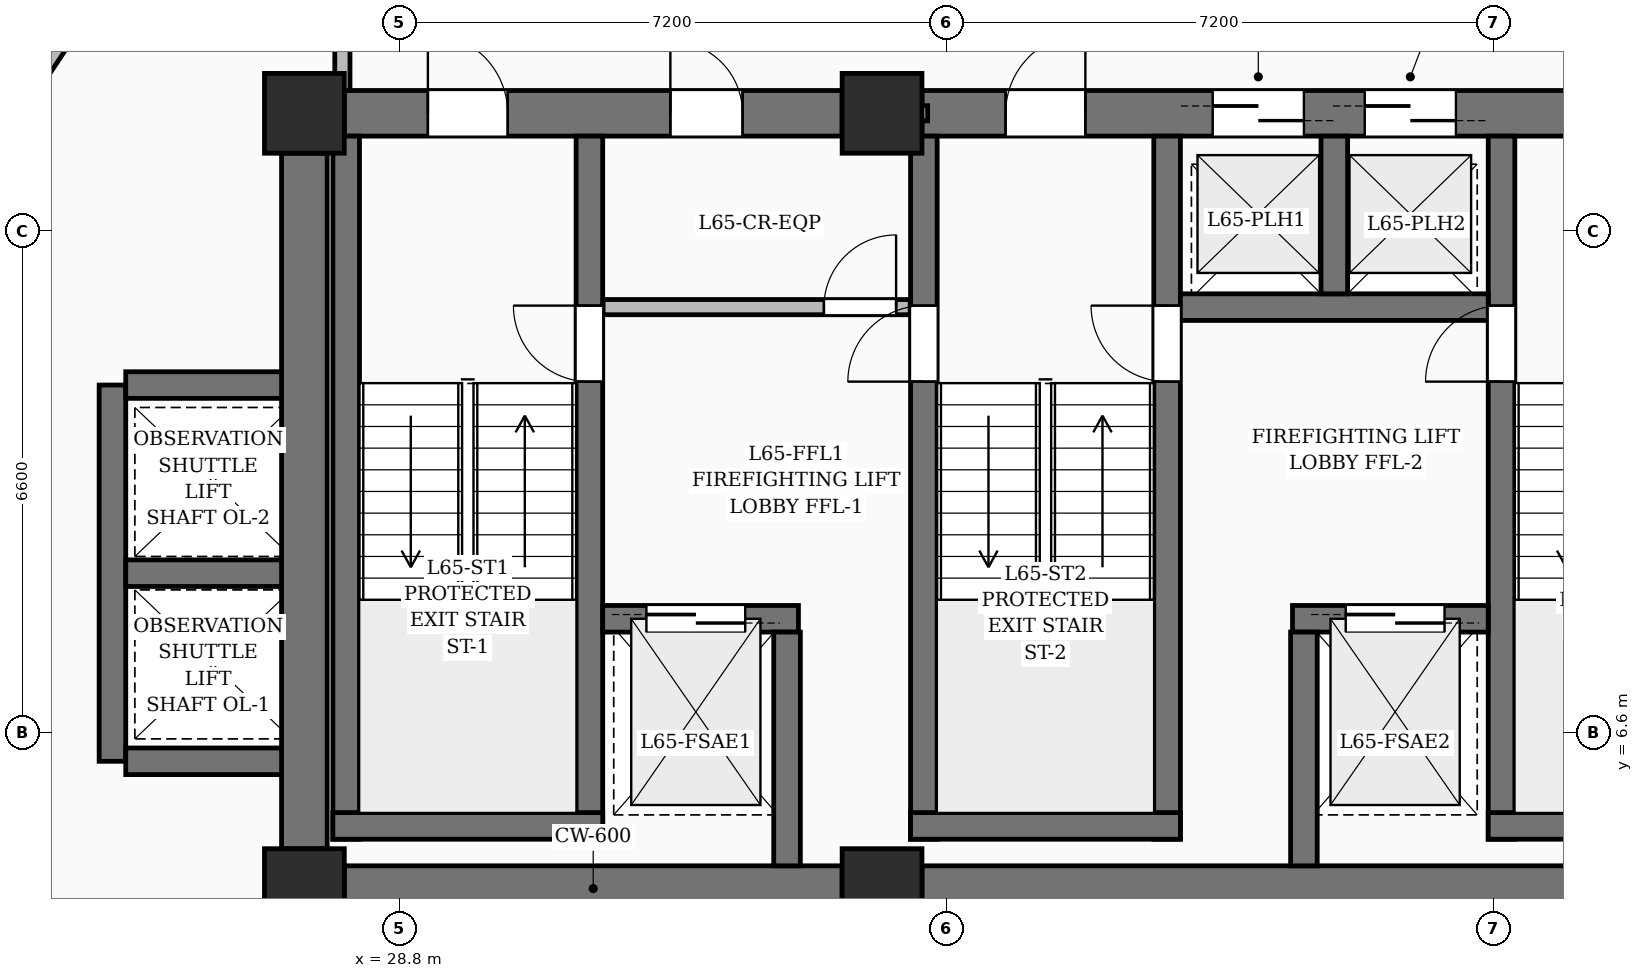
"""IFC4 building model, lengths in metres.
Left out: names, types, materials, properties, quantities, classifications, styles, units other than length and angle.
Written with IfcOpenShell. Run it as: python <this file> out.ifc"""

import sys

from ifc_helpers import new_model, si_unit, direction, frame, frame_2d, origin, origin_2d, place, context, subcontext, project, spatial, rectangle, extrude, element, fill, save


model = new_model("IFC4")
c1 = context("Model", 3, precision=1e-05, world=origin(), true_north=direction((0.0, 1.0)))
c2 = subcontext(c1, "Body", "Model", "MODEL_VIEW")
j1 = project(units=[si_unit("LENGTHUNIT", "METRE"), si_unit("PLANEANGLEUNIT", "RADIAN")], contexts=[c1])
p1 = place(None, origin())
s1 = spatial("IfcSite", under=j1, at=p1, CompositionType="ELEMENT")
p2 = place(p1, origin())
s2 = spatial("IfcBuilding", under=s1, at=p2, CompositionType="ELEMENT")
p3 = place(p2, frame((0.0, 0.0, 252.0)))
s3 = spatial("IfcBuildingStorey", under=s2, at=p3, CompositionType="ELEMENT", Elevation=252.0)
for number, where, z_axis, x_axis in (
    (1, (27.55, 4.55, 0.0), (0.0, 0.0, 1.0), (1.0, 0.0, 0.0)),
    (2, (35.15, 4.55, 0.0), (0.0, 0.0, 1.0), (1.0, 0.0, 0.0)),
    (3, (27.55, 14.75, 0.0), (0.0, 0.0, 1.0), (1.0, 0.0, 0.0)),
    (4, (35.15, 14.75, 0.0), (0.0, 0.0, 1.0), (1.0, 0.0, 0.0)),
):
    element("IfcColumn", number, at=place(p3, frame(where, z_axis=z_axis, x_axis=x_axis)), inside=s3, PredefinedType="COLUMN", context=c2, shape_type="SweptSolid", body=[
        extrude(rectangle(XDim=1.05, YDim=1.05, at=origin_2d()), origin(), (0.0, 0.0, 1.0), 3.75),
    ])
p4 = place(p3, frame((28.075, 4.55, 0.0), z_axis=(0.0, 0.0, 1.0), x_axis=(1.0, 0.0, 0.0)))
e5 = element("IfcWall", 5, at=p4, inside=s3, PredefinedType="SHEAR", context=c2, shape_type="SweptSolid", body=[
    extrude(rectangle(XDim=6.55, YDim=0.6, at=frame_2d((3.275, 0.0))), origin(), (0.0, 0.0, 1.0), 3.75),
])
p5 = place(p3, frame((35.675, 4.55, 0.0), z_axis=(0.0, 0.0, 1.0), x_axis=(1.0, 0.0, 0.0)))
e6 = element("IfcWall", 6, at=p5, inside=s3, PredefinedType="SHEAR", context=c2, shape_type="SweptSolid", body=[
    extrude(rectangle(XDim=10.85, YDim=0.6, at=frame_2d((5.425, 0.0))), origin(), (0.0, 0.0, 1.0), 3.75),
])
p6 = place(p3, frame((28.075, 14.75, 0.0), z_axis=(0.0, 0.0, 1.0), x_axis=(1.0, 0.0, 0.0)))
e7 = element("IfcWall", 7, at=p6, inside=s3, PredefinedType="SHEAR", context=c2, shape_type="SweptSolid", body=[
    extrude(rectangle(XDim=6.55, YDim=0.6, at=frame_2d((3.275, 0.0))), origin(), (0.0, 0.0, 1.0), 3.75),
])
p7 = place(p6, frame((1.1, 0.0, 0.0)))
e8 = element("IfcOpeningElement", 8, at=p7, cuts=e7, PredefinedType="OPENING", context=c2, shape_type="SweptSolid", body=[
    extrude(rectangle(XDim=1.05, YDim=2.15, at=frame_2d((0.525, 1.075))), frame((0.0, 0.31, 0.0), z_axis=(0.0, -1.0, 0.0), x_axis=(1.0, 0.0, 0.0)), (0.0, 0.0, 1.0), 0.62),
])
p8 = place(p6, frame((4.29, 0.0, 0.0)))
e9 = element("IfcOpeningElement", 9, at=p8, cuts=e7, PredefinedType="OPENING", context=c2, shape_type="SweptSolid", body=[
    extrude(rectangle(XDim=0.95, YDim=2.15, at=frame_2d((0.475, 1.075))), frame((0.0, 0.31, 0.0), z_axis=(0.0, -1.0, 0.0), x_axis=(1.0, 0.0, 0.0)), (0.0, 0.0, 1.0), 0.62),
])
p9 = place(p3, frame((35.675, 14.75, 0.0), z_axis=(0.0, 0.0, 1.0), x_axis=(1.0, 0.0, 0.0)))
e10 = element("IfcWall", 10, at=p9, inside=s3, PredefinedType="SHEAR", context=c2, shape_type="SweptSolid", body=[
    extrude(rectangle(XDim=10.85, YDim=0.6, at=frame_2d((5.425, 0.0))), origin(), (0.0, 0.0, 1.0), 3.75),
])
p10 = place(p9, frame((1.1, 0.0, 0.0)))
e11 = element("IfcOpeningElement", 11, at=p10, cuts=e10, PredefinedType="OPENING", context=c2, shape_type="SweptSolid", body=[
    extrude(rectangle(XDim=1.05, YDim=2.15, at=frame_2d((0.525, 1.075))), frame((0.0, 0.31, 0.0), z_axis=(0.0, -1.0, 0.0), x_axis=(1.0, 0.0, 0.0)), (0.0, 0.0, 1.0), 0.62),
])
p11 = place(p9, frame((8.7, 0.0, 0.0)))
e12 = element("IfcOpeningElement", 12, at=p11, cuts=e10, PredefinedType="OPENING", context=c2, shape_type="SweptSolid", body=[
    extrude(rectangle(XDim=1.05, YDim=2.15, at=frame_2d((0.525, 1.075))), frame((0.0, 0.31, 0.0), z_axis=(0.0, -1.0, 0.0), x_axis=(1.0, 0.0, 0.0)), (0.0, 0.0, 1.0), 0.62),
])
p12 = place(p9, frame((3.825, 0.0, 0.0)))
e13 = element("IfcOpeningElement", 13, at=p12, cuts=e10, PredefinedType="OPENING", context=c2, shape_type="SweptSolid", body=[
    extrude(rectangle(XDim=1.2, YDim=2.2, at=frame_2d((0.6, 1.1))), frame((0.0, 0.31, 0.0), z_axis=(0.0, -1.0, 0.0), x_axis=(1.0, 0.0, 0.0)), (0.0, 0.0, 1.0), 0.62),
])
p13 = place(p9, frame((5.825, 0.0, 0.0)))
e14 = element("IfcOpeningElement", 14, at=p13, cuts=e10, PredefinedType="OPENING", context=c2, shape_type="SweptSolid", body=[
    extrude(rectangle(XDim=1.2, YDim=2.2, at=frame_2d((0.6, 1.1))), frame((0.0, 0.31, 0.0), z_axis=(0.0, -1.0, 0.0), x_axis=(1.0, 0.0, 0.0)), (0.0, 0.0, 1.0), 0.62),
])
p14 = place(p3, frame((27.55, 5.075, 0.0), z_axis=(0.0, 0.0, 1.0), x_axis=(0.0, 1.0, 0.0)))
e15 = element("IfcWall", 15, at=p14, inside=s3, PredefinedType="SHEAR", context=c2, shape_type="SweptSolid", body=[
    extrude(rectangle(XDim=9.15, YDim=0.6, at=frame_2d((4.575, 0.0))), origin(), (0.0, 0.0, 1.0), 3.75),
])
p15 = place(p3, frame((28.1, 5.2, 0.0), z_axis=(0.0, 0.0, 1.0), x_axis=(0.0, 1.0, 0.0)))
e16 = element("IfcWall", 16, at=p15, inside=s3, PredefinedType="SOLIDWALL", context=c2, shape_type="SweptSolid", body=[
    extrude(rectangle(XDim=9.25, YDim=0.35, at=frame_2d((4.625, 0.0))), origin(), (0.0, 0.0, 1.0), 3.75),
])
p16 = place(p3, frame((31.3, 5.2, 0.0), z_axis=(0.0, 0.0, 1.0), x_axis=(0.0, 1.0, 0.0)))
e17 = element("IfcWall", 17, at=p16, inside=s3, PredefinedType="SOLIDWALL", context=c2, shape_type="SweptSolid", body=[
    extrude(rectangle(XDim=9.25, YDim=0.35, at=frame_2d((4.625, 0.0))), origin(), (0.0, 0.0, 1.0), 3.75),
])
p17 = place(p16, frame((6.02, 0.0, 0.0)))
e18 = element("IfcOpeningElement", 18, at=p17, cuts=e17, PredefinedType="OPENING", context=c2, shape_type="SweptSolid", body=[
    extrude(rectangle(XDim=1.0, YDim=2.15, at=frame_2d((0.5, 1.075))), frame((0.0, 0.185, 0.0), z_axis=(0.0, -1.0, 0.0), x_axis=(1.0, 0.0, 0.0)), (0.0, 0.0, 1.0), 0.37),
])
p18 = place(p3, frame((27.925, 5.375, 0.0), z_axis=(0.0, 0.0, 1.0), x_axis=(1.0, 0.0, 0.0)))
e19 = element("IfcWall", 19, at=p18, inside=s3, PredefinedType="SOLIDWALL", context=c2, shape_type="SweptSolid", body=[
    extrude(rectangle(XDim=3.55, YDim=0.35, at=frame_2d((1.775, 0.0))), origin(), (0.0, 0.0, 1.0), 3.75),
])
p19 = place(p3, frame((35.7, 5.2, 0.0), z_axis=(0.0, 0.0, 1.0), x_axis=(0.0, 1.0, 0.0)))
e20 = element("IfcWall", 20, at=p19, inside=s3, PredefinedType="SOLIDWALL", context=c2, shape_type="SweptSolid", body=[
    extrude(rectangle(XDim=9.25, YDim=0.35, at=frame_2d((4.625, 0.0))), origin(), (0.0, 0.0, 1.0), 3.75),
])
p20 = place(p19, frame((6.02, 0.0, 0.0)))
e21 = element("IfcOpeningElement", 21, at=p20, cuts=e20, PredefinedType="OPENING", context=c2, shape_type="SweptSolid", body=[
    extrude(rectangle(XDim=1.0, YDim=2.15, at=frame_2d((0.5, 1.075))), frame((0.0, 0.185, 0.0), z_axis=(0.0, -1.0, 0.0), x_axis=(1.0, 0.0, 0.0)), (0.0, 0.0, 1.0), 0.37),
])
p21 = place(p3, frame((38.9, 5.2, 0.0), z_axis=(0.0, 0.0, 1.0), x_axis=(0.0, 1.0, 0.0)))
e22 = element("IfcWall", 22, at=p21, inside=s3, PredefinedType="SOLIDWALL", context=c2, shape_type="SweptSolid", body=[
    extrude(rectangle(XDim=9.25, YDim=0.35, at=frame_2d((4.625, 0.0))), origin(), (0.0, 0.0, 1.0), 3.75),
])
p22 = place(p21, frame((6.02, 0.0, 0.0)))
e23 = element("IfcOpeningElement", 23, at=p22, cuts=e22, PredefinedType="OPENING", context=c2, shape_type="SweptSolid", body=[
    extrude(rectangle(XDim=1.0, YDim=2.15, at=frame_2d((0.5, 1.075))), frame((0.0, 0.185, 0.0), z_axis=(0.0, -1.0, 0.0), x_axis=(1.0, 0.0, 0.0)), (0.0, 0.0, 1.0), 0.37),
])
p23 = place(p3, frame((35.525, 5.375, 0.0), z_axis=(0.0, 0.0, 1.0), x_axis=(1.0, 0.0, 0.0)))
e24 = element("IfcWall", 24, at=p23, inside=s3, PredefinedType="SOLIDWALL", context=c2, shape_type="SweptSolid", body=[
    extrude(rectangle(XDim=3.55, YDim=0.35, at=frame_2d((1.775, 0.0))), origin(), (0.0, 0.0, 1.0), 3.75),
])
p24 = place(p3, frame((43.3, 5.2, 0.0), z_axis=(0.0, 0.0, 1.0), x_axis=(0.0, 1.0, 0.0)))
e25 = element("IfcWall", 25, at=p24, inside=s3, PredefinedType="SOLIDWALL", context=c2, shape_type="SweptSolid", body=[
    extrude(rectangle(XDim=9.25, YDim=0.35, at=frame_2d((4.625, 0.0))), origin(), (0.0, 0.0, 1.0), 3.75),
])
p25 = place(p24, frame((6.02, 0.0, 0.0)))
e26 = element("IfcOpeningElement", 26, at=p25, cuts=e25, PredefinedType="OPENING", context=c2, shape_type="SweptSolid", body=[
    extrude(rectangle(XDim=1.0, YDim=2.15, at=frame_2d((0.5, 1.075))), frame((0.0, 0.185, 0.0), z_axis=(0.0, -1.0, 0.0), x_axis=(1.0, 0.0, 0.0)), (0.0, 0.0, 1.0), 0.37),
])
p26 = place(p3, frame((43.125, 5.375, 0.0), z_axis=(0.0, 0.0, 1.0), x_axis=(1.0, 0.0, 0.0)))
e27 = element("IfcWall", 27, at=p26, inside=s3, PredefinedType="SOLIDWALL", context=c2, shape_type="SweptSolid", body=[
    extrude(rectangle(XDim=3.55, YDim=0.35, at=frame_2d((1.775, 0.0))), origin(), (0.0, 0.0, 1.0), 3.75),
])
p27 = place(p3, frame((31.475, 8.1, 0.0), z_axis=(0.0, 0.0, 1.0), x_axis=(1.0, 0.0, 0.0)))
e28 = element("IfcWall", 28, at=p27, inside=s3, PredefinedType="SOLIDWALL", context=c2, shape_type="SweptSolid", body=[
    extrude(rectangle(XDim=2.575, YDim=0.35, at=frame_2d((1.288, 0.0))), origin(), (0.0, 0.0, 1.0), 3.75),
])
p28 = place(p27, frame((0.575, 0.0, 0.0)))
e29 = element("IfcOpeningElement", 29, at=p28, cuts=e28, PredefinedType="OPENING", context=c2, shape_type="SweptSolid", body=[
    extrude(rectangle(XDim=1.3, YDim=2.25, at=frame_2d((0.65, 1.125))), frame((0.0, 0.185, 0.0), z_axis=(0.0, -1.0, 0.0), x_axis=(1.0, 0.0, 0.0)), (0.0, 0.0, 1.0), 0.37),
])
p29 = place(p3, frame((40.55, 8.1, 0.0), z_axis=(0.0, 0.0, 1.0), x_axis=(1.0, 0.0, 0.0)))
e30 = element("IfcWall", 30, at=p29, inside=s3, PredefinedType="SOLIDWALL", context=c2, shape_type="SweptSolid", body=[
    extrude(rectangle(XDim=2.575, YDim=0.35, at=frame_2d((1.288, 0.0))), origin(), (0.0, 0.0, 1.0), 3.75),
])
p30 = place(p29, frame((0.7, 0.0, 0.0)))
e31 = element("IfcOpeningElement", 31, at=p30, cuts=e30, PredefinedType="OPENING", context=c2, shape_type="SweptSolid", body=[
    extrude(rectangle(XDim=1.3, YDim=2.25, at=frame_2d((0.65, 1.125))), frame((0.0, 0.185, 0.0), z_axis=(0.0, -1.0, 0.0), x_axis=(1.0, 0.0, 0.0)), (0.0, 0.0, 1.0), 0.37),
])
for number, where, z_axis, x_axis in (
    (32, (33.9, 4.85, 0.0), (0.0, 0.0, 1.0), (0.0, 1.0, 0.0)),
    (33, (40.7, 4.85, 0.0), (0.0, 0.0, 1.0), (0.0, 1.0, 0.0)),
):
    element("IfcWall", number, at=place(p3, frame(where, z_axis=z_axis, x_axis=x_axis)), inside=s3, PredefinedType="SOLIDWALL", context=c2, shape_type="SweptSolid", body=[
        extrude(rectangle(XDim=3.075, YDim=0.35, at=frame_2d((1.538, 0.0))), origin(), (0.0, 0.0, 1.0), 3.75),
    ])
p31 = place(p3, frame((39.075, 12.2, 0.0), z_axis=(0.0, 0.0, 1.0), x_axis=(1.0, 0.0, 0.0)))
e34 = element("IfcWall", 34, at=p31, inside=s3, PredefinedType="SOLIDWALL", context=c2, shape_type="SweptSolid", body=[
    extrude(rectangle(XDim=4.05, YDim=0.35, at=frame_2d((2.025, 0.0))), origin(), (0.0, 0.0, 1.0), 3.75),
])
p32 = place(p3, frame((41.1, 12.375, 0.0), z_axis=(0.0, 0.0, 1.0), x_axis=(0.0, 1.0, 0.0)))
e35 = element("IfcWall", 35, at=p32, inside=s3, PredefinedType="SOLIDWALL", context=c2, shape_type="SweptSolid", body=[
    extrude(rectangle(XDim=2.075, YDim=0.35, at=frame_2d((1.038, 0.0))), origin(), (0.0, 0.0, 1.0), 3.75),
])
p33 = place(p3, frame((25.025, 6.225, 0.0), z_axis=(0.0, 0.0, 1.0), x_axis=(0.0, 1.0, 0.0)))
e36 = element("IfcWall", 36, at=p33, inside=s3, PredefinedType="SOLIDWALL", context=c2, shape_type="SweptSolid", body=[
    extrude(rectangle(XDim=4.95, YDim=0.35, at=frame_2d((2.475, 0.0))), origin(), (0.0, 0.0, 1.0), 3.75),
])
for number, where, z_axis, x_axis in (
    (37, (25.2, 6.225, 0.0), (0.0, 0.0, 1.0), (1.0, 0.0, 0.0)),
    (38, (25.2, 8.7, 0.0), (0.0, 0.0, 1.0), (1.0, 0.0, 0.0)),
    (39, (25.2, 11.175, 0.0), (0.0, 0.0, 1.0), (1.0, 0.0, 0.0)),
):
    element("IfcWall", number, at=place(p3, frame(where, z_axis=z_axis, x_axis=x_axis)), inside=s3, PredefinedType="SOLIDWALL", context=c2, shape_type="SweptSolid", body=[
        extrude(rectangle(XDim=2.05, YDim=0.35, at=frame_2d((1.025, 0.0))), origin(), (0.0, 0.0, 1.0), 3.75),
    ])
p34 = place(p3, frame((21.351, 11.241, 0.0), z_axis=(0.0, 0.0, 1.0), x_axis=(0.552108099649, 0.833772538707, 0.0)))
e40 = element("IfcWall", 40, at=p34, inside=s3, PredefinedType="SOLIDWALL", context=c2, shape_type="SweptSolid", body=[
    extrude(rectangle(XDim=7.463, YDim=0.3, at=frame_2d((3.731, 0.0))), origin(), (0.0, 0.0, 1.0), 3.5),
])
p35 = place(p34, frame((2.325, 0.0, 0.6)))
e41 = element("IfcOpeningElement", 41, at=p35, cuts=e40, PredefinedType="OPENING", context=c2, shape_type="SweptSolid", body=[
    extrude(rectangle(XDim=2.4, YDim=2.1, at=frame_2d((1.2, 1.05))), frame((0.0, 0.16, 0.0), z_axis=(0.0, -1.0, 0.0), x_axis=(1.0, 0.0, 0.0)), (0.0, 0.0, 1.0), 0.32),
])
p36 = place(p3, frame((34.72, 14.75, 0.0), z_axis=(0.0, 0.0, 1.0), x_axis=(1.0, 0.0, 0.0)))
e42 = element("IfcWall", 42, at=p36, inside=s3, PredefinedType="PARTITIONING", context=c2, shape_type="SweptSolid", body=[
    extrude(rectangle(XDim=1.03, YDim=0.2, at=frame_2d((0.515, 0.0))), origin(), (0.0, 0.0, 1.0), 2.685),
])
p37 = place(p3, frame((31.48, 12.2, 0.0), z_axis=(0.0, 0.0, 1.0), x_axis=(1.0, 0.0, 0.0)))
e43 = element("IfcWall", 43, at=p37, inside=s3, PredefinedType="PARTITIONING", context=c2, shape_type="SweptSolid", body=[
    extrude(rectangle(XDim=4.04, YDim=0.2, at=frame_2d((2.02, 0.0))), origin(), (0.0, 0.0, 1.0), 3.5),
])
p38 = place(p37, frame((2.905, 0.0, 0.0)))
e44 = element("IfcOpeningElement", 44, at=p38, cuts=e43, PredefinedType="OPENING", context=c2, shape_type="SweptSolid", body=[
    extrude(rectangle(XDim=0.95, YDim=2.15, at=frame_2d((0.475, 1.075))), frame((0.0, 0.11, 0.0), z_axis=(0.0, -1.0, 0.0), x_axis=(1.0, 0.0, 0.0)), (0.0, 0.0, 1.0), 0.22),
])
p39 = place(p3, frame((28.05, 17.265, 0.0), z_axis=(0.0, 0.0, 1.0), x_axis=(0.0, -1.0, 0.0)))
e45 = element("IfcWall", 45, at=p39, inside=s3, PredefinedType="PARTITIONING", context=c2, shape_type="SweptSolid", body=[
    extrude(rectangle(XDim=2.215, YDim=0.2, at=frame_2d((1.107, 0.0))), origin(), (0.0, 0.0, 1.0), 3.5),
])
p40 = place(p7, origin())
e46 = element("IfcDoor", 46, at=p40, inside=s3, OperationType="SINGLE_SWING_LEFT", PredefinedType="DOOR", context=c2, shape_type="SweptSolid", body=[
    extrude(rectangle(XDim=1.05, YDim=2.15, at=frame_2d((0.525, 1.075))), frame((0.0, 0.025, 0.0), z_axis=(0.0, -1.0, 0.0), x_axis=(1.0, 0.0, 0.0)), (0.0, 0.0, 1.0), 0.05),
])
fill(e8, e46)
p41 = place(p10, origin())
e47 = element("IfcDoor", 47, at=p41, inside=s3, OperationType="SINGLE_SWING_RIGHT", PredefinedType="DOOR", context=c2, shape_type="SweptSolid", body=[
    extrude(rectangle(XDim=1.05, YDim=2.15, at=frame_2d((0.525, 1.075))), frame((0.0, 0.025, 0.0), z_axis=(0.0, -1.0, 0.0), x_axis=(1.0, 0.0, 0.0)), (0.0, 0.0, 1.0), 0.05),
])
fill(e11, e47)
p42 = place(p17, origin())
e48 = element("IfcDoor", 48, at=p42, inside=s3, OperationType="SINGLE_SWING_RIGHT", PredefinedType="DOOR", context=c2, shape_type="SweptSolid", body=[
    extrude(rectangle(XDim=1.0, YDim=2.15, at=frame_2d((0.5, 1.075))), frame((0.0, 0.025, 0.0), z_axis=(0.0, -1.0, 0.0), x_axis=(1.0, 0.0, 0.0)), (0.0, 0.0, 1.0), 0.05),
])
fill(e18, e48)
p43 = place(p20, origin())
e49 = element("IfcDoor", 49, at=p43, inside=s3, OperationType="SINGLE_SWING_LEFT", PredefinedType="DOOR", context=c2, shape_type="SweptSolid", body=[
    extrude(rectangle(XDim=1.0, YDim=2.15, at=frame_2d((0.5, 1.075))), frame((0.0, 0.025, 0.0), z_axis=(0.0, -1.0, 0.0), x_axis=(1.0, 0.0, 0.0)), (0.0, 0.0, 1.0), 0.05),
])
fill(e21, e49)
p44 = place(p22, origin())
e50 = element("IfcDoor", 50, at=p44, inside=s3, OperationType="SINGLE_SWING_RIGHT", PredefinedType="DOOR", context=c2, shape_type="SweptSolid", body=[
    extrude(rectangle(XDim=1.0, YDim=2.15, at=frame_2d((0.5, 1.075))), frame((0.0, 0.025, 0.0), z_axis=(0.0, -1.0, 0.0), x_axis=(1.0, 0.0, 0.0)), (0.0, 0.0, 1.0), 0.05),
])
fill(e23, e50)
p45 = place(p25, origin())
e51 = element("IfcDoor", 51, at=p45, inside=s3, OperationType="SINGLE_SWING_LEFT", PredefinedType="DOOR", context=c2, shape_type="SweptSolid", body=[
    extrude(rectangle(XDim=1.0, YDim=2.15, at=frame_2d((0.5, 1.075))), frame((0.0, 0.025, 0.0), z_axis=(0.0, -1.0, 0.0), x_axis=(1.0, 0.0, 0.0)), (0.0, 0.0, 1.0), 0.05),
])
fill(e26, e51)
p46 = place(p28, origin())
e52 = element("IfcDoor", 52, at=p46, inside=s3, OperationType="DOUBLE_DOOR_SLIDING", PredefinedType="DOOR", context=c2, shape_type="SweptSolid", body=[
    extrude(rectangle(XDim=1.3, YDim=2.25, at=frame_2d((0.65, 1.125))), frame((0.0, 0.025, 0.0), z_axis=(0.0, -1.0, 0.0), x_axis=(1.0, 0.0, 0.0)), (0.0, 0.0, 1.0), 0.05),
])
fill(e29, e52)
p47 = place(p30, origin())
e53 = element("IfcDoor", 53, at=p47, inside=s3, OperationType="DOUBLE_DOOR_SLIDING", PredefinedType="DOOR", context=c2, shape_type="SweptSolid", body=[
    extrude(rectangle(XDim=1.3, YDim=2.25, at=frame_2d((0.65, 1.125))), frame((0.0, 0.025, 0.0), z_axis=(0.0, -1.0, 0.0), x_axis=(1.0, 0.0, 0.0)), (0.0, 0.0, 1.0), 0.05),
])
fill(e31, e53)
p48 = place(p12, origin())
e54 = element("IfcDoor", 54, at=p48, inside=s3, OperationType="DOUBLE_DOOR_SLIDING", PredefinedType="DOOR", context=c2, shape_type="SweptSolid", body=[
    extrude(rectangle(XDim=1.2, YDim=2.2, at=frame_2d((0.6, 1.1))), frame((0.0, 0.025, 0.0), z_axis=(0.0, -1.0, 0.0), x_axis=(1.0, 0.0, 0.0)), (0.0, 0.0, 1.0), 0.05),
])
fill(e13, e54)
p49 = place(p13, origin())
e55 = element("IfcDoor", 55, at=p49, inside=s3, OperationType="DOUBLE_DOOR_SLIDING", PredefinedType="DOOR", context=c2, shape_type="SweptSolid", body=[
    extrude(rectangle(XDim=1.2, YDim=2.2, at=frame_2d((0.6, 1.1))), frame((0.0, 0.025, 0.0), z_axis=(0.0, -1.0, 0.0), x_axis=(1.0, 0.0, 0.0)), (0.0, 0.0, 1.0), 0.05),
])
fill(e14, e55)
p50 = place(p38, origin())
e56 = element("IfcDoor", 56, at=p50, inside=s3, OperationType="SINGLE_SWING_RIGHT", PredefinedType="DOOR", context=c2, shape_type="SweptSolid", body=[
    extrude(rectangle(XDim=0.95, YDim=2.15, at=frame_2d((0.475, 1.075))), frame((0.0, 0.025, 0.0), z_axis=(0.0, -1.0, 0.0), x_axis=(1.0, 0.0, 0.0)), (0.0, 0.0, 1.0), 0.05),
])
fill(e44, e56)
p51 = place(p8, origin())
e57 = element("IfcDoor", 57, at=p51, inside=s3, OperationType="SINGLE_SWING_LEFT", PredefinedType="DOOR", context=c2, shape_type="SweptSolid", body=[
    extrude(rectangle(XDim=0.95, YDim=2.15, at=frame_2d((0.475, 1.075))), frame((0.0, 0.025, 0.0), z_axis=(0.0, -1.0, 0.0), x_axis=(1.0, 0.0, 0.0)), (0.0, 0.0, 1.0), 0.05),
])
fill(e9, e57)
save(model, sys.argv[1])
